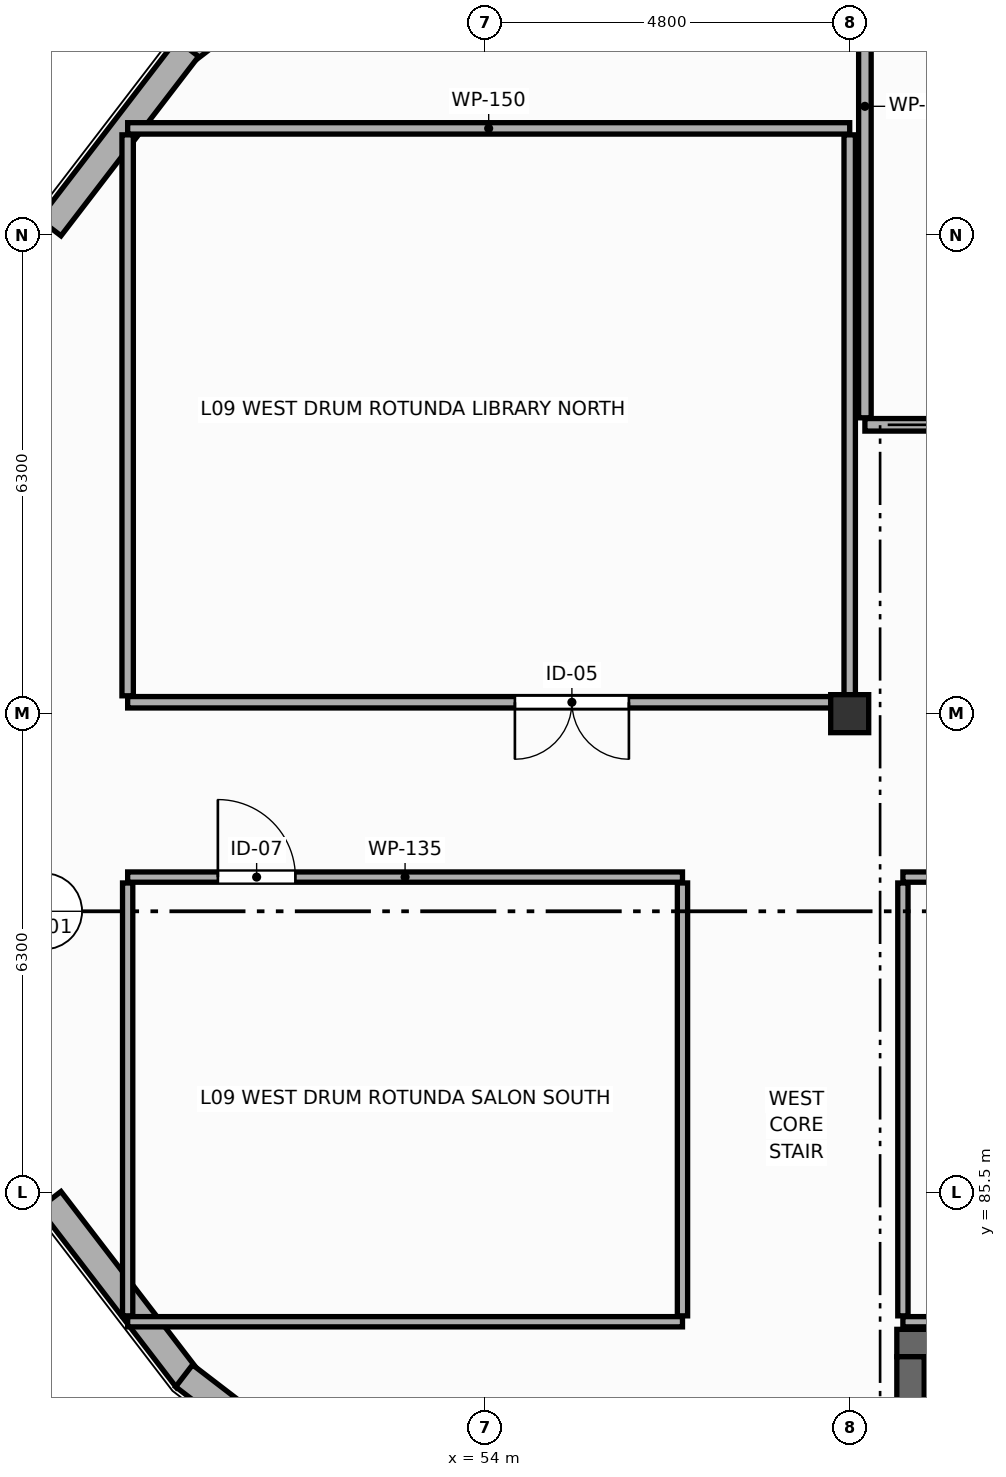
"""IFC4 building model, lengths in metres.
Left out: names, types, materials, properties, quantities, classifications, styles, units other than length and angle.
Written with IfcOpenShell. Run it as: python <this file> out.ifc"""

import sys

from ifc_helpers import new_model, si_unit, direction, frame, frame_2d, origin, origin_2d, place, context, subcontext, project, spatial, rectangle, extrude, element, fill, save


model = new_model("IFC4")
c1 = context("Model", 3, precision=1e-05, world=origin(), true_north=direction((0.0, 1.0)))
c2 = subcontext(c1, "Body", "Model", "MODEL_VIEW")
j1 = project(units=[si_unit("LENGTHUNIT", "METRE"), si_unit("PLANEANGLEUNIT", "RADIAN")], contexts=[c1])
p1 = place(None, origin())
s1 = spatial("IfcSite", under=j1, at=p1, CompositionType="ELEMENT")
p2 = place(p1, origin())
s2 = spatial("IfcBuilding", under=s1, at=p2, CompositionType="ELEMENT")
p3 = place(p2, frame((0.0, 0.0, 35.4)))
s3 = spatial("IfcBuildingStorey", under=s2, at=p3, CompositionType="ELEMENT", Elevation=35.4)
p4 = place(p3, frame((58.8, 91.8, 0.0), z_axis=(0.0, 0.0, 1.0), x_axis=(1.0, 0.0, 0.0)))
e1 = element("IfcColumn", 1, at=p4, inside=s3, PredefinedType="COLUMN", context=c2, shape_type="SweptSolid", body=[
    extrude(rectangle(XDim=0.5, YDim=0.5, at=origin_2d()), origin(), (0.0, 0.0, 1.0), 4.2),
])
p5 = place(p3, frame((52.402, 102.322, 0.0), z_axis=(0.0, 0.0, 1.0), x_axis=(-0.793361877219, -0.608750303306, 0.0)))
e2 = element("IfcWall", 2, at=p5, inside=s3, PredefinedType="ELEMENTEDWALL", context=c2, shape_type="SweptSolid", body=[
    extrude(rectangle(XDim=2.974, YDim=0.365, at=frame_2d((1.487, 0.0))), origin(), (0.0, 0.0, 1.0), 2.995),
])
p6 = place(p5, frame((1.087, 0.0, 0.85)))
e3 = element("IfcOpeningElement", 3, at=p6, cuts=e2, PredefinedType="OPENING", context=c2, shape_type="SweptSolid", body=[
    extrude(rectangle(XDim=0.8, YDim=1.7, at=frame_2d((0.4, 0.85))), frame((0.0, 0.192, 0.0), z_axis=(0.0, -1.0, 0.0), x_axis=(1.0, 0.0, 0.0)), (0.0, 0.0, 1.0), 0.385),
])
p7 = place(p3, frame((50.089, 100.557, 0.0), z_axis=(0.0, 0.0, 1.0), x_axis=(-0.608750303306, -0.793361877219, 0.0)))
e4 = element("IfcWall", 4, at=p7, inside=s3, PredefinedType="ELEMENTEDWALL", context=c2, shape_type="SweptSolid", body=[
    extrude(rectangle(XDim=2.974, YDim=0.365, at=frame_2d((1.487, 0.0))), origin(), (0.0, 0.0, 1.0), 3.095),
])
p8 = place(p3, frame((48.278, 85.402, 0.0), z_axis=(0.0, 0.0, 1.0), x_axis=(0.608710660898, -0.793392293452, 0.0)))
e5 = element("IfcWall", 5, at=p8, inside=s3, PredefinedType="ELEMENTEDWALL", context=c2, shape_type="SweptSolid", body=[
    extrude(rectangle(XDim=2.974, YDim=0.365, at=frame_2d((1.487, 0.0))), origin(), (0.0, 0.0, 1.0), 3.095),
])
p9 = place(p3, frame((50.043, 83.089, 0.0), z_axis=(0.0, 0.0, 1.0), x_axis=(0.793361877219, -0.608750303306, 0.0)))
e6 = element("IfcWall", 6, at=p9, inside=s3, PredefinedType="ELEMENTEDWALL", context=c2, shape_type="SweptSolid", body=[
    extrude(rectangle(XDim=2.974, YDim=0.365, at=frame_2d((1.487, 0.0))), origin(), (0.0, 0.0, 1.0), 2.995),
])
p10 = place(p9, frame((1.087, 0.0, 0.85)))
e7 = element("IfcOpeningElement", 7, at=p10, cuts=e6, PredefinedType="OPENING", context=c2, shape_type="SweptSolid", body=[
    extrude(rectangle(XDim=0.8, YDim=1.7, at=frame_2d((0.4, 0.85))), frame((0.0, 0.192, 0.0), z_axis=(0.0, -1.0, 0.0), x_axis=(1.0, 0.0, 0.0)), (0.0, 0.0, 1.0), 0.385),
])
p11 = place(p3, frame((58.8, 79.7, 4.2), z_axis=(0.0, 0.0, 1.0), x_axis=(0.0, 1.0, 0.0)))
e8 = element("IfcWall", 8, at=p11, inside=s3, PredefinedType="PARAPET", context=c2, shape_type="SweptSolid", body=[
    extrude(rectangle(XDim=24.2, YDim=0.245, at=frame_2d((12.1, 0.0))), origin(), (0.0, 0.0, 1.0), 1.15),
])
p12 = place(p3, frame((59.42, 83.52, 0.0), z_axis=(0.0, 0.0, 1.0), x_axis=(1.0, 0.0, 0.0)))
e9 = element("IfcWall", 9, at=p12, inside=s3, PredefinedType="SHEAR", context=c2, shape_type="SweptSolid", body=[
    extrude(rectangle(XDim=9.36, YDim=0.36, at=frame_2d((4.68, 0.0))), origin(), (0.0, 0.0, 1.0), 3.98),
])
p13 = place(p3, frame((59.6, 79.98, 0.0), z_axis=(0.0, 0.0, 1.0), x_axis=(0.0, 1.0, 0.0)))
e10 = element("IfcWall", 10, at=p13, inside=s3, PredefinedType="SHEAR", context=c2, shape_type="SweptSolid", body=[
    extrude(rectangle(XDim=3.36, YDim=0.36, at=frame_2d((1.68, 0.0))), origin(), (0.0, 0.0, 1.0), 3.98),
])
p14 = place(p13, frame((1.08, 0.0, 0.0)))
e11 = element("IfcOpeningElement", 11, at=p14, cuts=e10, PredefinedType="OPENING", context=c2, shape_type="SweptSolid", body=[
    extrude(rectangle(XDim=1.2, YDim=2.2, at=frame_2d((0.6, 1.1))), frame((0.0, 0.19, 0.0), z_axis=(0.0, -1.0, 0.0), x_axis=(1.0, 0.0, 0.0)), (0.0, 0.0, 1.0), 0.38),
])
p15 = place(p3, frame((59.5, 89.65, 0.0), z_axis=(0.0, 0.0, 1.0), x_axis=(1.0, 0.0, 0.0)))
e12 = element("IfcWall", 12, at=p15, inside=s3, PredefinedType="PARTITIONING", context=c2, shape_type="SweptSolid", body=[
    extrude(rectangle(XDim=3.5, YDim=0.135, at=frame_2d((1.75, 0.0))), origin(), (0.0, 0.0, 1.0), 3.95),
])
p16 = place(p15, frame((1.275, 0.0, 0.0)))
e13 = element("IfcOpeningElement", 13, at=p16, cuts=e12, PredefinedType="OPENING", context=c2, shape_type="SweptSolid", body=[
    extrude(rectangle(XDim=0.95, YDim=2.15, at=frame_2d((0.475, 1.075))), frame((0.0, 0.077, 0.0), z_axis=(0.0, -1.0, 0.0), x_axis=(1.0, 0.0, 0.0)), (0.0, 0.0, 1.0), 0.155),
])
p17 = place(p3, frame((63.0, 83.8, 0.0), z_axis=(0.0, 0.0, 1.0), x_axis=(-1.0, 0.0, 0.0)))
e14 = element("IfcWall", 14, at=p17, inside=s3, PredefinedType="PARTITIONING", context=c2, shape_type="SweptSolid", body=[
    extrude(rectangle(XDim=3.5, YDim=0.135, at=frame_2d((1.75, 0.0))), origin(), (0.0, 0.0, 1.0), 3.95),
])
p18 = place(p3, frame((59.5, 83.877, 0.0), z_axis=(0.0, 0.0, 1.0), x_axis=(0.0, 1.0, 0.0)))
e15 = element("IfcWall", 15, at=p18, inside=s3, PredefinedType="PARTITIONING", context=c2, shape_type="SweptSolid", body=[
    extrude(rectangle(XDim=5.695, YDim=0.135, at=frame_2d((2.848, 0.0))), origin(), (0.0, 0.0, 1.0), 3.95),
])
p19 = place(p3, frame((72.4, 95.6, 0.0), z_axis=(0.0, 0.0, 1.0), x_axis=(-1.0, 0.0, 0.0)))
e16 = element("IfcWall", 16, at=p19, inside=s3, PredefinedType="PARTITIONING", context=c2, shape_type="SweptSolid", body=[
    extrude(rectangle(XDim=13.4, YDim=0.165, at=frame_2d((6.7, 0.0))), origin(), (0.0, 0.0, 1.0), 3.095),
])
p20 = place(p3, frame((59.0, 95.692, 0.0), z_axis=(0.0, 0.0, 1.0), x_axis=(0.0, 1.0, 0.0)))
e17 = element("IfcWall", 17, at=p20, inside=s3, PredefinedType="PARTITIONING", context=c2, shape_type="SweptSolid", body=[
    extrude(rectangle(XDim=8.304, YDim=0.165, at=frame_2d((4.152, 0.0))), origin(), (0.0, 0.0, 1.0), 3.095),
])
p21 = place(p3, frame((49.3, 99.5, 0.0), z_axis=(0.0, 0.0, 1.0), x_axis=(1.0, 0.0, 0.0)))
e18 = element("IfcWall", 18, at=p21, inside=s3, PredefinedType="PARTITIONING", context=c2, shape_type="SweptSolid", body=[
    extrude(rectangle(XDim=9.5, YDim=0.15, at=frame_2d((4.75, 0.0))), origin(), (0.0, 0.0, 1.0), 2.995),
])
p22 = place(p3, frame((58.8, 91.95, 0.0), z_axis=(0.0, 0.0, 1.0), x_axis=(-1.0, 0.0, 0.0)))
e19 = element("IfcWall", 19, at=p22, inside=s3, PredefinedType="PARTITIONING", context=c2, shape_type="SweptSolid", body=[
    extrude(rectangle(XDim=9.5, YDim=0.15, at=frame_2d((4.75, 0.0))), origin(), (0.0, 0.0, 1.0), 2.995),
])
p23 = place(p22, frame((2.905, 0.0, 0.0)))
e20 = element("IfcOpeningElement", 20, at=p23, cuts=e19, PredefinedType="OPENING", context=c2, shape_type="SweptSolid", body=[
    extrude(rectangle(XDim=1.5, YDim=2.35, at=frame_2d((0.75, 1.175))), frame((0.0, 0.085, 0.0), z_axis=(0.0, -1.0, 0.0), x_axis=(1.0, 0.0, 0.0)), (0.0, 0.0, 1.0), 0.17),
])
p24 = place(p3, frame((49.3, 92.035, 0.0), z_axis=(0.0, 0.0, 1.0), x_axis=(0.0, 1.0, 0.0)))
e21 = element("IfcWall", 21, at=p24, inside=s3, PredefinedType="PARTITIONING", context=c2, shape_type="SweptSolid", body=[
    extrude(rectangle(XDim=7.38, YDim=0.15, at=frame_2d((3.69, 0.0))), origin(), (0.0, 0.0, 1.0), 3.595),
])
p25 = place(p3, frame((58.8, 99.415, 0.0), z_axis=(0.0, 0.0, 1.0), x_axis=(0.0, -1.0, 0.0)))
e22 = element("IfcWall", 22, at=p25, inside=s3, PredefinedType="PARTITIONING", context=c2, shape_type="SweptSolid", body=[
    extrude(rectangle(XDim=7.38, YDim=0.15, at=frame_2d((3.69, 0.0))), origin(), (0.0, 0.0, 1.0), 3.095),
])
p26 = place(p3, frame((49.3, 89.65, 0.0), z_axis=(0.0, 0.0, 1.0), x_axis=(1.0, 0.0, 0.0)))
e23 = element("IfcWall", 23, at=p26, inside=s3, PredefinedType="PARTITIONING", context=c2, shape_type="SweptSolid", body=[
    extrude(rectangle(XDim=7.3, YDim=0.135, at=frame_2d((3.65, 0.0))), origin(), (0.0, 0.0, 1.0), 2.995),
])
p27 = place(p26, frame((1.187, 0.0, 0.0)))
e24 = element("IfcOpeningElement", 24, at=p27, cuts=e23, PredefinedType="OPENING", context=c2, shape_type="SweptSolid", body=[
    extrude(rectangle(XDim=1.02, YDim=2.15, at=frame_2d((0.51, 1.075))), frame((0.0, 0.077, 0.0), z_axis=(0.0, -1.0, 0.0), x_axis=(1.0, 0.0, 0.0)), (0.0, 0.0, 1.0), 0.155),
])
p28 = place(p3, frame((56.6, 83.8, 0.0), z_axis=(0.0, 0.0, 1.0), x_axis=(-1.0, 0.0, 0.0)))
e25 = element("IfcWall", 25, at=p28, inside=s3, PredefinedType="PARTITIONING", context=c2, shape_type="SweptSolid", body=[
    extrude(rectangle(XDim=7.3, YDim=0.135, at=frame_2d((3.65, 0.0))), origin(), (0.0, 0.0, 1.0), 2.995),
])
p29 = place(p3, frame((49.3, 83.877, 0.0), z_axis=(0.0, 0.0, 1.0), x_axis=(0.0, 1.0, 0.0)))
e26 = element("IfcWall", 26, at=p29, inside=s3, PredefinedType="PARTITIONING", context=c2, shape_type="SweptSolid", body=[
    extrude(rectangle(XDim=5.695, YDim=0.135, at=frame_2d((2.848, 0.0))), origin(), (0.0, 0.0, 1.0), 3.595),
])
p30 = place(p3, frame((56.6, 89.573, 0.0), z_axis=(0.0, 0.0, 1.0), x_axis=(0.0, -1.0, 0.0)))
e27 = element("IfcWall", 27, at=p30, inside=s3, PredefinedType="PARTITIONING", context=c2, shape_type="SweptSolid", body=[
    extrude(rectangle(XDim=5.695, YDim=0.135, at=frame_2d((2.848, 0.0))), origin(), (0.0, 0.0, 1.0), 3.95),
])
p31 = place(p23, origin())
e28 = element("IfcDoor", 28, at=p31, inside=s3, OperationType="DOUBLE_DOOR_SINGLE_SWING", PredefinedType="DOOR", context=c2, shape_type="SweptSolid", body=[
    extrude(rectangle(XDim=1.5, YDim=2.35, at=frame_2d((0.75, 1.175))), frame((0.0, 0.025, 0.0), z_axis=(0.0, -1.0, 0.0), x_axis=(1.0, 0.0, 0.0)), (0.0, 0.0, 1.0), 0.05),
])
fill(e20, e28)
p32 = place(p27, origin())
e29 = element("IfcDoor", 29, at=p32, inside=s3, OperationType="SINGLE_SWING_LEFT", PredefinedType="DOOR", context=c2, shape_type="SweptSolid", body=[
    extrude(rectangle(XDim=1.02, YDim=2.15, at=frame_2d((0.51, 1.075))), frame((0.0, 0.025, 0.0), z_axis=(0.0, -1.0, 0.0), x_axis=(1.0, 0.0, 0.0)), (0.0, 0.0, 1.0), 0.05),
])
fill(e24, e29)
save(model, sys.argv[1])
